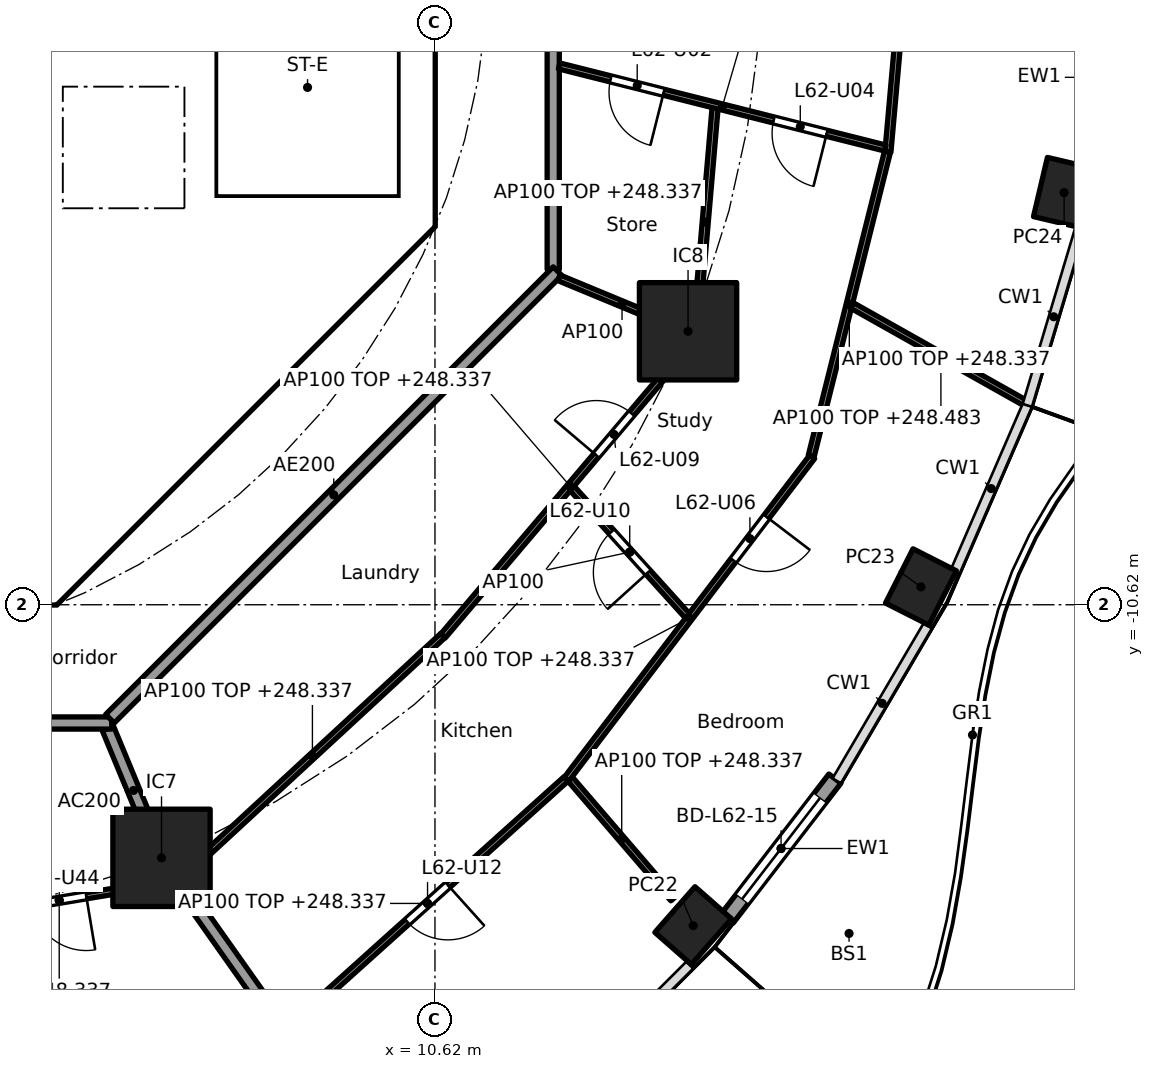
"""IFC4 building model, lengths in metres.
Left out: names, types, materials, properties, quantities, classifications, styles, units other than length and angle.
Written with IfcOpenShell. Run it as: python <this file> out.ifc"""

import sys

from ifc_helpers import new_model, si_unit, direction, frame, frame_2d, origin, origin_2d, place, context, subcontext, project, spatial, polyline, rectangle, hollow_rectangle, outline, extrude, element, fill, save


model = new_model("IFC4")
c1 = context("Model", 3, precision=1e-05, world=origin(), true_north=direction((0.0, 1.0)))
c2 = subcontext(c1, "Body", "Model", "MODEL_VIEW")
j1 = project(units=[si_unit("LENGTHUNIT", "METRE"), si_unit("PLANEANGLEUNIT", "RADIAN")], contexts=[c1])
p1 = place(None, origin())
s1 = spatial("IfcSite", under=j1, at=p1, CompositionType="ELEMENT")
p2 = place(p1, origin())
s2 = spatial("IfcBuilding", under=s1, at=p2, CompositionType="ELEMENT")
p3 = place(p2, frame((0.0, 0.0, 245.5)))
s3 = spatial("IfcBuildingStorey", under=s2, at=p3, CompositionType="ELEMENT", Elevation=245.5)
for number, where, z_axis, x_axis in (
    (1, (14.866, -15.896, 0.0), (0.0, 0.0, 1.0), (0.66, 0.751, 0.0)),
    (2, (18.612, -10.327, 0.0), (0.0, 0.0, 1.0), (0.452, 0.892, 0.0)),
    (3, (20.967, -3.842, 0.0), (0.0, 0.0, 1.0), (0.229, 0.973, 0.0)),
):
    element("IfcColumn", number, at=place(p3, frame(where, z_axis=z_axis, x_axis=x_axis)), inside=s3, PredefinedType="COLUMN", context=c2, shape_type="SweptSolid", body=[
        extrude(hollow_rectangle(XDim=1.0, YDim=0.8, WallThickness=0.032, at=origin_2d()), origin(), (0.0, 0.0, 1.0), 3.7),
    ])
for number, where, z_axis, x_axis in (
    (4, (6.123, -14.782, 0.0), (0.0, 0.0, 1.0), (1.0, 0.0, 0.0)),
    (5, (14.782, -6.123, 0.0), (0.0, 0.0, 1.0), (1.0, 0.0, 0.0)),
):
    element("IfcColumn", number, at=place(p3, frame(where, z_axis=z_axis, x_axis=x_axis)), inside=s3, PredefinedType="COLUMN", context=c2, shape_type="SweptSolid", body=[
        extrude(rectangle(XDim=1.6, YDim=1.6, at=origin_2d()), origin(), (0.0, 0.0, 1.0), 3.7),
    ])
p4 = place(p3, frame((17.197, -13.48, 0.0), z_axis=(0.0, 0.0, 1.0), x_axis=(-0.610438565676, -0.792063607001, 0.0)))
e6 = element("IfcWall", 6, at=p4, inside=s3, PredefinedType="SOLIDWALL", context=c2, shape_type="SweptSolid", body=[
    extrude(rectangle(XDim=2.901, YDim=0.25, at=frame_2d((1.45, 0.0))), origin(), (0.0, 0.0, 1.0), 3.44),
])
p5 = place(p4, frame((0.4, 0.0, 0.0)))
e7 = element("IfcOpeningElement", 7, at=p5, cuts=e6, PredefinedType="OPENING", context=c2, shape_type="SweptSolid", body=[
    extrude(rectangle(XDim=2.1, YDim=2.4, at=frame_2d((1.05, 1.2))), frame((0.0, 0.135, 0.0), z_axis=(0.0, -1.0, 0.0), x_axis=(1.0, 0.0, 0.0)), (0.0, 0.0, 1.0), 0.27),
])
p6 = place(p3, frame((4.613, -9.988, 0.0), z_axis=(0.0, 0.0, 1.0), x_axis=(0.707106781187, 0.707106781187, 0.0)))
e8 = element("IfcWall", 8, at=p6, inside=s3, PredefinedType="SHEAR", context=c2, shape_type="SweptSolid", body=[
    extrude(rectangle(XDim=7.602, YDim=0.6, at=frame_2d((3.801, 0.0))), origin(), (0.0, 0.0, 1.0), 3.44),
])
p7 = place(p6, frame((3.201, 0.0, 0.0)))
e9 = element("IfcOpeningElement", 9, at=p7, cuts=e8, PredefinedType="OPENING", context=c2, shape_type="SweptSolid", body=[
    extrude(rectangle(XDim=1.2, YDim=2.1, at=frame_2d((0.6, 1.05))), frame((0.0, 0.31, 0.0), z_axis=(0.0, -1.0, 0.0), x_axis=(1.0, 0.0, 0.0)), (0.0, 0.0, 1.0), 0.62),
])
p8 = place(p3, frame((-6.7, -2.0, 0.0), z_axis=(0.0, 0.0, 1.0), x_axis=(1.0, 0.0, 0.0)))
e10 = element("IfcWall", 10, at=p8, inside=s3, PredefinedType="SOLIDWALL", context=c2, shape_type="SweptSolid", body=[
    extrude(rectangle(XDim=13.4, YDim=0.2, at=frame_2d((6.7, 0.0))), origin(), (0.0, 0.0, 1.0), 3.44),
])
p9 = place(p8, frame((5.05, 0.0, 0.0)))
e11 = element("IfcOpeningElement", 11, at=p9, cuts=e10, PredefinedType="OPENING", context=c2, shape_type="SweptSolid", body=[
    extrude(rectangle(XDim=1.1, YDim=2.1, at=frame_2d((0.55, 1.05))), frame((0.0, 0.11, 0.0), z_axis=(0.0, -1.0, 0.0), x_axis=(1.0, 0.0, 0.0)), (0.0, 0.0, 1.0), 0.22),
])
p10 = place(p8, frame((7.25, 0.0, 0.0)))
e12 = element("IfcOpeningElement", 12, at=p10, cuts=e10, PredefinedType="OPENING", context=c2, shape_type="SweptSolid", body=[
    extrude(rectangle(XDim=1.1, YDim=2.1, at=frame_2d((0.55, 1.05))), frame((0.0, 0.11, 0.0), z_axis=(0.0, -1.0, 0.0), x_axis=(1.0, 0.0, 0.0)), (0.0, 0.0, 1.0), 0.22),
])
p11 = place(p8, frame((1.85, 0.0, 0.0)))
e13 = element("IfcOpeningElement", 13, at=p11, cuts=e10, PredefinedType="OPENING", context=c2, shape_type="SweptSolid", body=[
    extrude(rectangle(XDim=0.9, YDim=2.1, at=frame_2d((0.45, 1.05))), frame((0.0, 0.11, 0.0), z_axis=(0.0, -1.0, 0.0), x_axis=(1.0, 0.0, 0.0)), (0.0, 0.0, 1.0), 0.22),
])
p12 = place(p3, origin())
e14 = element("IfcWall", 14, at=p12, inside=s3, PredefinedType="SHEAR", context=c2, shape_type="SweptSolid", body=[
    extrude(outline(polyline([(-4.152, -10.025), (4.152, -10.025), (4.401, -9.776), (4.825, -10.2), (4.401, -10.625), (-4.401, -10.625), (-4.825, -10.2), (-4.401, -9.776), (-4.152, -10.025)])), origin(), (0.0, 0.0, 1.0), 3.44),
])
p13 = place(p3, origin())
e15 = element("IfcWall", 15, at=p13, inside=s3, PredefinedType="SHEAR", context=c2, shape_type="SweptSolid", body=[
    extrude(outline(polyline([(9.776, -4.401), (10.025, -4.152), (10.025, -3.801), (10.025, 4.152), (9.776, 4.401), (10.2, 4.825), (10.625, 4.401), (10.625, -4.401), (10.2, -4.825), (9.776, -4.401)])), origin(), (0.0, 0.0, 1.0), 3.44),
])
p14 = place(p3, origin())
e16 = element("IfcWall", 16, at=p14, inside=s3, PredefinedType="SOLIDWALL", context=c2, shape_type="SweptSolid", body=[
    extrude(outline(polyline([(-6.7, -2.1), (-6.5, -2.1), (-6.5, -4.1), (-2.3, -4.1), (-2.3, -2.1), (-2.1, -2.1), (-2.1, -4.1), (-0.1, -4.1), (-0.1, -2.1), (0.1, -2.1), (0.1, -4.1), (2.1, -4.1), (2.1, -2.1), (2.3, -2.1), (2.3, -4.1), (4.3, -4.1), (4.3, -2.1), (4.5, -2.1), (4.5, -4.1), (6.5, -4.1), (6.5, -2.1), (6.7, -2.1), (6.7, -4.3), (-6.7, -4.3), (-6.7, -2.1)])), origin(), (0.0, 0.0, 1.0), 3.44),
])
p15 = place(p3, origin())
e17 = element("IfcWall", 17, at=p15, inside=s3, PredefinedType="SOLIDWALL", context=c2, shape_type="SweptSolid", body=[
    extrude(outline(polyline([(7.025, -3.9), (6.7, -3.9), (6.7, 3.9), (7.025, 3.9), (7.025, -3.9)])), origin(), (0.0, 0.0, 1.0), 3.44),
])
p16 = place(p3, origin())
e18 = element("IfcWall", 18, at=p16, inside=s3, PredefinedType="SOLIDWALL", context=c2, shape_type="SweptSolid", body=[
    extrude(outline(polyline([(10.025, -4.1), (6.7, -4.1), (6.7, -3.9), (10.025, -3.9), (10.025, -4.1)])), origin(), (0.0, 0.0, 1.0), 3.44),
])
p17 = place(p3, frame((5.243, -12.657, 0.0), z_axis=(0.0, 0.0, 1.0), x_axis=(0.382691608661, -0.923876145736, 0.0)))
e19 = element("IfcWall", 19, at=p17, inside=s3, PredefinedType="PARTITIONING", context=c2, shape_type="SweptSolid", body=[
    extrude(rectangle(XDim=2.2, YDim=0.2, at=frame_2d((1.1, 0.0))), origin(), (0.0, 0.0, 1.0), 3.44),
])
p18 = place(p3, frame((6.152, -14.823, 0.0), z_axis=(0.0, 0.0, 1.0), x_axis=(0.576994695158, -0.816747893637, 0.0)))
e20 = element("IfcWall", 20, at=p18, inside=s3, PredefinedType="PARTITIONING", context=c2, shape_type="SweptSolid", body=[
    extrude(rectangle(XDim=6.03, YDim=0.2, at=frame_2d((3.015, 0.0))), origin(), (0.0, 0.0, 1.0), 2.837),
])
p19 = place(p3, frame((12.565, -5.104, 0.0), z_axis=(0.0, 0.0, 1.0), x_axis=(0.0, 1.0, 0.0)))
e21 = element("IfcWall", 21, at=p19, inside=s3, PredefinedType="PARTITIONING", context=c2, shape_type="SweptSolid", body=[
    extrude(rectangle(XDim=10.209, YDim=0.2, at=frame_2d((5.104, 0.0))), origin(), (0.0, 0.0, 1.0), 3.44),
])
p20 = place(p19, frame((4.604, 0.0, 0.0)))
e22 = element("IfcOpeningElement", 22, at=p20, cuts=e21, PredefinedType="OPENING", context=c2, shape_type="SweptSolid", body=[
    extrude(rectangle(XDim=1.0, YDim=2.1, at=frame_2d((0.5, 1.05))), frame((0.0, 0.11, 0.0), z_axis=(0.0, -1.0, 0.0), x_axis=(1.0, 0.0, 0.0)), (0.0, 0.0, 1.0), 0.22),
])
p21 = place(p3, frame((-5.104, -12.565, 0.0), z_axis=(0.0, 0.0, 1.0), x_axis=(1.0, 0.0, 0.0)))
e23 = element("IfcWall", 23, at=p21, inside=s3, PredefinedType="PARTITIONING", context=c2, shape_type="SweptSolid", body=[
    extrude(rectangle(XDim=10.409, YDim=0.2, at=frame_2d((5.205, 0.0))), origin(), (0.0, 0.0, 1.0), 3.44),
])
p22 = place(p21, frame((2.87, 0.0, 0.0)))
e24 = element("IfcOpeningElement", 24, at=p22, cuts=e23, PredefinedType="OPENING", context=c2, shape_type="SweptSolid", body=[
    extrude(rectangle(XDim=1.0, YDim=2.1, at=frame_2d((0.5, 1.05))), frame((0.0, 0.11, 0.0), z_axis=(0.0, -1.0, 0.0), x_axis=(1.0, 0.0, 0.0)), (0.0, 0.0, 1.0), 0.22),
])
p23 = place(p3, frame((5.275, -12.494, 0.0), z_axis=(0.0, 0.0, 1.0), x_axis=(0.707106781187, 0.707106781187, 0.0)))
e25 = element("IfcWall", 25, at=p23, inside=s3, PredefinedType="PARTITIONING", context=c2, shape_type="SweptSolid", body=[
    extrude(rectangle(XDim=10.409, YDim=0.2, at=frame_2d((5.205, 0.0))), origin(), (0.0, 0.0, 1.0), 3.44),
])
p24 = place(p3, frame((18.578, 2.542, 0.0), z_axis=(0.0, 0.0, 1.0), x_axis=(-0.088651453697, -0.996062708748, 0.0)))
e26 = element("IfcWall", 26, at=p24, inside=s3, PredefinedType="PARTITIONING", context=c2, shape_type="SweptSolid", body=[
    extrude(rectangle(XDim=5.737, YDim=0.1, at=frame_2d((2.868, 0.0))), origin(), (0.0, 0.0, 1.0), 2.837),
])
p25 = place(p24, frame((2.393, 0.0, 0.0)))
e27 = element("IfcOpeningElement", 27, at=p25, cuts=e26, PredefinedType="OPENING", context=c2, shape_type="SweptSolid", body=[
    extrude(rectangle(XDim=0.9, YDim=2.1, at=frame_2d((0.45, 1.05))), frame((0.0, 0.06, 0.0), z_axis=(0.0, -1.0, 0.0), x_axis=(1.0, 0.0, 0.0)), (0.0, 0.0, 1.0), 0.12),
])
p26 = place(p3, frame((2.593, -15.789, 0.0), z_axis=(0.0, 0.0, 1.0), x_axis=(0.986385117656, 0.164451815639, 0.0)))
e28 = element("IfcWall", 28, at=p26, inside=s3, PredefinedType="PARTITIONING", context=c2, shape_type="SweptSolid", body=[
    extrude(rectangle(XDim=3.747, YDim=0.1, at=frame_2d((1.874, 0.0))), origin(), (0.0, 0.0, 1.0), 2.837),
])
p27 = place(p26, frame((1.424, 0.0, 0.0)))
e29 = element("IfcOpeningElement", 29, at=p27, cuts=e28, PredefinedType="OPENING", context=c2, shape_type="SweptSolid", body=[
    extrude(rectangle(XDim=0.9, YDim=2.1, at=frame_2d((0.45, 1.05))), frame((0.0, 0.06, 0.0), z_axis=(0.0, -1.0, 0.0), x_axis=(1.0, 0.0, 0.0)), (0.0, 0.0, 1.0), 0.12),
])
p28 = place(p3, frame((6.461, -15.088, 0.0), z_axis=(0.0, 0.0, 1.0), x_axis=(0.73461579427, 0.678483334217, 0.0)))
e30 = element("IfcWall", 30, at=p28, inside=s3, PredefinedType="PARTITIONING", context=c2, shape_type="SweptSolid", body=[
    extrude(rectangle(XDim=5.837, YDim=0.1, at=frame_2d((2.918, 0.0))), origin(), (0.0, 0.0, 1.0), 2.837),
])
p29 = place(p3, frame((8.22, -17.579, 0.0), z_axis=(0.0, 0.0, 1.0), x_axis=(0.743696370895, 0.668517544958, 0.0)))
e31 = element("IfcWall", 31, at=p29, inside=s3, PredefinedType="PARTITIONING", context=c2, shape_type="SweptSolid", body=[
    extrude(rectangle(XDim=6.125, YDim=0.1, at=frame_2d((3.062, 0.0))), origin(), (0.0, 0.0, 1.0), 2.837),
])
p30 = place(p29, frame((2.612, 0.0, 0.0)))
e32 = element("IfcOpeningElement", 32, at=p30, cuts=e31, PredefinedType="OPENING", context=c2, shape_type="SweptSolid", body=[
    extrude(rectangle(XDim=0.9, YDim=2.1, at=frame_2d((0.45, 1.05))), frame((0.0, 0.06, 0.0), z_axis=(0.0, -1.0, 0.0), x_axis=(1.0, 0.0, 0.0)), (0.0, 0.0, 1.0), 0.12),
])
p31 = place(p3, frame((10.753, -11.132, 0.0), z_axis=(0.0, 0.0, 1.0), x_axis=(0.64700741656, 0.762483706657, 0.0)))
e33 = element("IfcWall", 33, at=p31, inside=s3, PredefinedType="PARTITIONING", context=c2, shape_type="SweptSolid", body=[
    extrude(rectangle(XDim=6.459, YDim=0.1, at=frame_2d((3.229, 0.0))), origin(), (0.0, 0.0, 1.0), 2.837),
])
p32 = place(p31, frame((3.896, 0.0, 0.0)))
e34 = element("IfcOpeningElement", 34, at=p32, cuts=e33, PredefinedType="OPENING", context=c2, shape_type="SweptSolid", body=[
    extrude(rectangle(XDim=0.9, YDim=2.1, at=frame_2d((0.45, 1.05))), frame((0.0, 0.06, 0.0), z_axis=(0.0, -1.0, 0.0), x_axis=(1.0, 0.0, 0.0)), (0.0, 0.0, 1.0), 0.12),
])
p33 = place(p3, frame((12.845, -13.489, 0.0), z_axis=(0.0, 0.0, 1.0), x_axis=(0.652092276587, -0.758139606416, 0.0)))
e35 = element("IfcWall", 35, at=p33, inside=s3, PredefinedType="PARTITIONING", context=c2, shape_type="SweptSolid", body=[
    extrude(rectangle(XDim=2.594, YDim=0.1, at=frame_2d((1.297, 0.0))), origin(), (0.0, 0.0, 1.0), 2.837),
])
p34 = place(p3, frame((12.782, -13.491, 0.0), z_axis=(0.0, 0.0, 1.0), x_axis=(0.606125925512, 0.795368695903, 0.0)))
e36 = element("IfcWall", 36, at=p34, inside=s3, PredefinedType="PARTITIONING", context=c2, shape_type="SweptSolid", body=[
    extrude(rectangle(XDim=6.67, YDim=0.1, at=frame_2d((3.335, 0.0))), origin(), (0.0, 0.0, 1.0), 2.837),
])
p35 = place(p34, frame((4.527, 0.0, 0.0)))
e37 = element("IfcOpeningElement", 37, at=p35, cuts=e36, PredefinedType="OPENING", context=c2, shape_type="SweptSolid", body=[
    extrude(rectangle(XDim=0.9, YDim=2.1, at=frame_2d((0.45, 1.05))), frame((0.0, 0.06, 0.0), z_axis=(0.0, -1.0, 0.0), x_axis=(1.0, 0.0, 0.0)), (0.0, 0.0, 1.0), 0.12),
])
p36 = place(p3, frame((12.876, -8.707, 0.0), z_axis=(0.0, 0.0, 1.0), x_axis=(0.670768418052, -0.741666858733, 0.0)))
e38 = element("IfcWall", 38, at=p36, inside=s3, PredefinedType="PARTITIONING", context=c2, shape_type="SweptSolid", body=[
    extrude(rectangle(XDim=2.824, YDim=0.1, at=frame_2d((1.412, 0.0))), origin(), (0.0, 0.0, 1.0), 3.44),
])
p37 = place(p36, frame((0.962, 0.0, 0.0)))
e39 = element("IfcOpeningElement", 39, at=p37, cuts=e38, PredefinedType="OPENING", context=c2, shape_type="SweptSolid", body=[
    extrude(rectangle(XDim=0.9, YDim=2.1, at=frame_2d((0.45, 1.05))), frame((0.0, 0.06, 0.0), z_axis=(0.0, -1.0, 0.0), x_axis=(1.0, 0.0, 0.0)), (0.0, 0.0, 1.0), 0.12),
])
p38 = place(p3, frame((12.657, -5.243, 0.0), z_axis=(0.0, 0.0, 1.0), x_axis=(0.923864733477, -0.382719158442, 0.0)))
e40 = element("IfcWall", 40, at=p38, inside=s3, PredefinedType="PARTITIONING", context=c2, shape_type="SweptSolid", body=[
    extrude(rectangle(XDim=2.25, YDim=0.1, at=frame_2d((1.125, 0.0))), origin(), (0.0, 0.0, 1.0), 3.44),
])
p39 = place(p3, frame((14.904, -6.196, 0.0), z_axis=(0.0, 0.0, 1.0), x_axis=(0.085843822439, 0.996308605879, 0.0)))
e41 = element("IfcWall", 41, at=p39, inside=s3, PredefinedType="PARTITIONING", context=c2, shape_type="SweptSolid", body=[
    extrude(rectangle(XDim=3.754, YDim=0.1, at=frame_2d((1.877, 0.0))), origin(), (0.0, 0.0, 1.0), 2.837),
])
p40 = place(p3, frame((16.807, -8.177, 0.0), z_axis=(0.0, 0.0, 1.0), x_axis=(0.243002985225, 0.970025540474, 0.0)))
e42 = element("IfcWall", 42, at=p40, inside=s3, PredefinedType="PARTITIONING", context=c2, shape_type="SweptSolid", body=[
    extrude(rectangle(XDim=5.162, YDim=0.1, at=frame_2d((2.581, 0.0))), origin(), (0.0, 0.0, 1.0), 2.837),
])
p41 = place(p3, frame((17.478, -5.698, 0.0), z_axis=(0.0, 0.0, 1.0), x_axis=(0.871478399743, -0.490433888288, 0.0)))
e43 = element("IfcWall", 43, at=p41, inside=s3, PredefinedType="PARTITIONING", context=c2, shape_type="SweptSolid", body=[
    extrude(rectangle(XDim=3.357, YDim=0.1, at=frame_2d((1.678, 0.0))), origin(), (0.0, 0.0, 1.0), 2.983),
])
p42 = place(p3, frame((12.662, -1.759, 0.0), z_axis=(0.0, 0.0, 1.0), x_axis=(0.969746519828, -0.24411408661, 0.0)))
e44 = element("IfcWall", 44, at=p42, inside=s3, PredefinedType="PARTITIONING", context=c2, shape_type="SweptSolid", body=[
    extrude(rectangle(XDim=5.531, YDim=0.1, at=frame_2d((2.765, 0.0))), origin(), (0.0, 0.0, 1.0), 2.762),
])
p43 = place(p42, frame((0.874, 0.0, 0.0)))
e45 = element("IfcOpeningElement", 45, at=p43, cuts=e44, PredefinedType="OPENING", context=c2, shape_type="SweptSolid", body=[
    extrude(rectangle(XDim=0.9, YDim=2.1, at=frame_2d((0.45, 1.05))), frame((0.0, 0.06, 0.0), z_axis=(0.0, -1.0, 0.0), x_axis=(1.0, 0.0, 0.0)), (0.0, 0.0, 1.0), 0.12),
])
p44 = place(p42, frame((3.64, 0.0, 0.0)))
e46 = element("IfcOpeningElement", 46, at=p44, cuts=e44, PredefinedType="OPENING", context=c2, shape_type="SweptSolid", body=[
    extrude(rectangle(XDim=0.9, YDim=2.1, at=frame_2d((0.45, 1.05))), frame((0.0, 0.06, 0.0), z_axis=(0.0, -1.0, 0.0), x_axis=(1.0, 0.0, 0.0)), (0.0, 0.0, 1.0), 0.12),
])
p45 = place(p5, origin())
e47 = element("IfcDoor", 47, at=p45, inside=s3, OperationType="SLIDING_TO_LEFT", PredefinedType="DOOR", context=c2, shape_type="SweptSolid", body=[
    extrude(rectangle(XDim=2.1, YDim=2.4, at=frame_2d((1.05, 1.2))), frame((0.0, 0.025, 0.0), z_axis=(0.0, -1.0, 0.0), x_axis=(1.0, 0.0, 0.0)), (0.0, 0.0, 1.0), 0.05),
])
fill(e7, e47)
p46 = place(p7, origin())
e48 = element("IfcDoor", 48, at=p46, inside=s3, OperationType="SINGLE_SWING_RIGHT", PredefinedType="DOOR", context=c2, shape_type="SweptSolid", body=[
    extrude(rectangle(XDim=1.2, YDim=2.1, at=frame_2d((0.6, 1.05))), frame((0.0, 0.025, 0.0), z_axis=(0.0, -1.0, 0.0), x_axis=(1.0, 0.0, 0.0)), (0.0, 0.0, 1.0), 0.05),
])
fill(e9, e48)
p47 = place(p43, frame((0.9, 0.0, 0.0), x_axis=(-1.0, 0.0, 0.0)))
e49 = element("IfcDoor", 49, at=p47, inside=s3, OperationType="SINGLE_SWING_LEFT", PredefinedType="DOOR", context=c2, shape_type="SweptSolid", body=[
    extrude(rectangle(XDim=0.9, YDim=2.1, at=frame_2d((0.45, 1.05))), frame((0.0, 0.025, 0.0), z_axis=(0.0, -1.0, 0.0), x_axis=(1.0, 0.0, 0.0)), (0.0, 0.0, 1.0), 0.05),
])
fill(e45, e49)
p48 = place(p44, frame((0.9, 0.0, 0.0), x_axis=(-1.0, 0.0, 0.0)))
e50 = element("IfcDoor", 50, at=p48, inside=s3, OperationType="SINGLE_SWING_LEFT", PredefinedType="DOOR", context=c2, shape_type="SweptSolid", body=[
    extrude(rectangle(XDim=0.9, YDim=2.1, at=frame_2d((0.45, 1.05))), frame((0.0, 0.025, 0.0), z_axis=(0.0, -1.0, 0.0), x_axis=(1.0, 0.0, 0.0)), (0.0, 0.0, 1.0), 0.05),
])
fill(e46, e50)
p49 = place(p35, frame((0.9, 0.0, 0.0), x_axis=(-1.0, 0.0, 0.0)))
e51 = element("IfcDoor", 51, at=p49, inside=s3, OperationType="SINGLE_SWING_LEFT", PredefinedType="DOOR", context=c2, shape_type="SweptSolid", body=[
    extrude(rectangle(XDim=0.9, YDim=2.1, at=frame_2d((0.45, 1.05))), frame((0.0, 0.025, 0.0), z_axis=(0.0, -1.0, 0.0), x_axis=(1.0, 0.0, 0.0)), (0.0, 0.0, 1.0), 0.05),
])
fill(e37, e51)
p50 = place(p32, origin())
e52 = element("IfcDoor", 52, at=p50, inside=s3, OperationType="SINGLE_SWING_LEFT", PredefinedType="DOOR", context=c2, shape_type="SweptSolid", body=[
    extrude(rectangle(XDim=0.9, YDim=2.1, at=frame_2d((0.45, 1.05))), frame((0.0, 0.025, 0.0), z_axis=(0.0, -1.0, 0.0), x_axis=(1.0, 0.0, 0.0)), (0.0, 0.0, 1.0), 0.05),
])
fill(e34, e52)
p51 = place(p37, frame((0.9, 0.0, 0.0), x_axis=(-1.0, 0.0, 0.0)))
e53 = element("IfcDoor", 53, at=p51, inside=s3, OperationType="SINGLE_SWING_LEFT", PredefinedType="DOOR", context=c2, shape_type="SweptSolid", body=[
    extrude(rectangle(XDim=0.9, YDim=2.1, at=frame_2d((0.45, 1.05))), frame((0.0, 0.025, 0.0), z_axis=(0.0, -1.0, 0.0), x_axis=(1.0, 0.0, 0.0)), (0.0, 0.0, 1.0), 0.05),
])
fill(e39, e53)
p52 = place(p30, frame((0.9, 0.0, 0.0), x_axis=(-1.0, 0.0, 0.0)))
e54 = element("IfcDoor", 54, at=p52, inside=s3, OperationType="SINGLE_SWING_LEFT", PredefinedType="DOOR", context=c2, shape_type="SweptSolid", body=[
    extrude(rectangle(XDim=0.9, YDim=2.1, at=frame_2d((0.45, 1.05))), frame((0.0, 0.025, 0.0), z_axis=(0.0, -1.0, 0.0), x_axis=(1.0, 0.0, 0.0)), (0.0, 0.0, 1.0), 0.05),
])
fill(e32, e54)
p53 = place(p27, frame((0.9, 0.0, 0.0), x_axis=(-1.0, 0.0, 0.0)))
e55 = element("IfcDoor", 55, at=p53, inside=s3, OperationType="SINGLE_SWING_LEFT", PredefinedType="DOOR", context=c2, shape_type="SweptSolid", body=[
    extrude(rectangle(XDim=0.9, YDim=2.1, at=frame_2d((0.45, 1.05))), frame((0.0, 0.025, 0.0), z_axis=(0.0, -1.0, 0.0), x_axis=(1.0, 0.0, 0.0)), (0.0, 0.0, 1.0), 0.05),
])
fill(e29, e55)
save(model, sys.argv[1])
